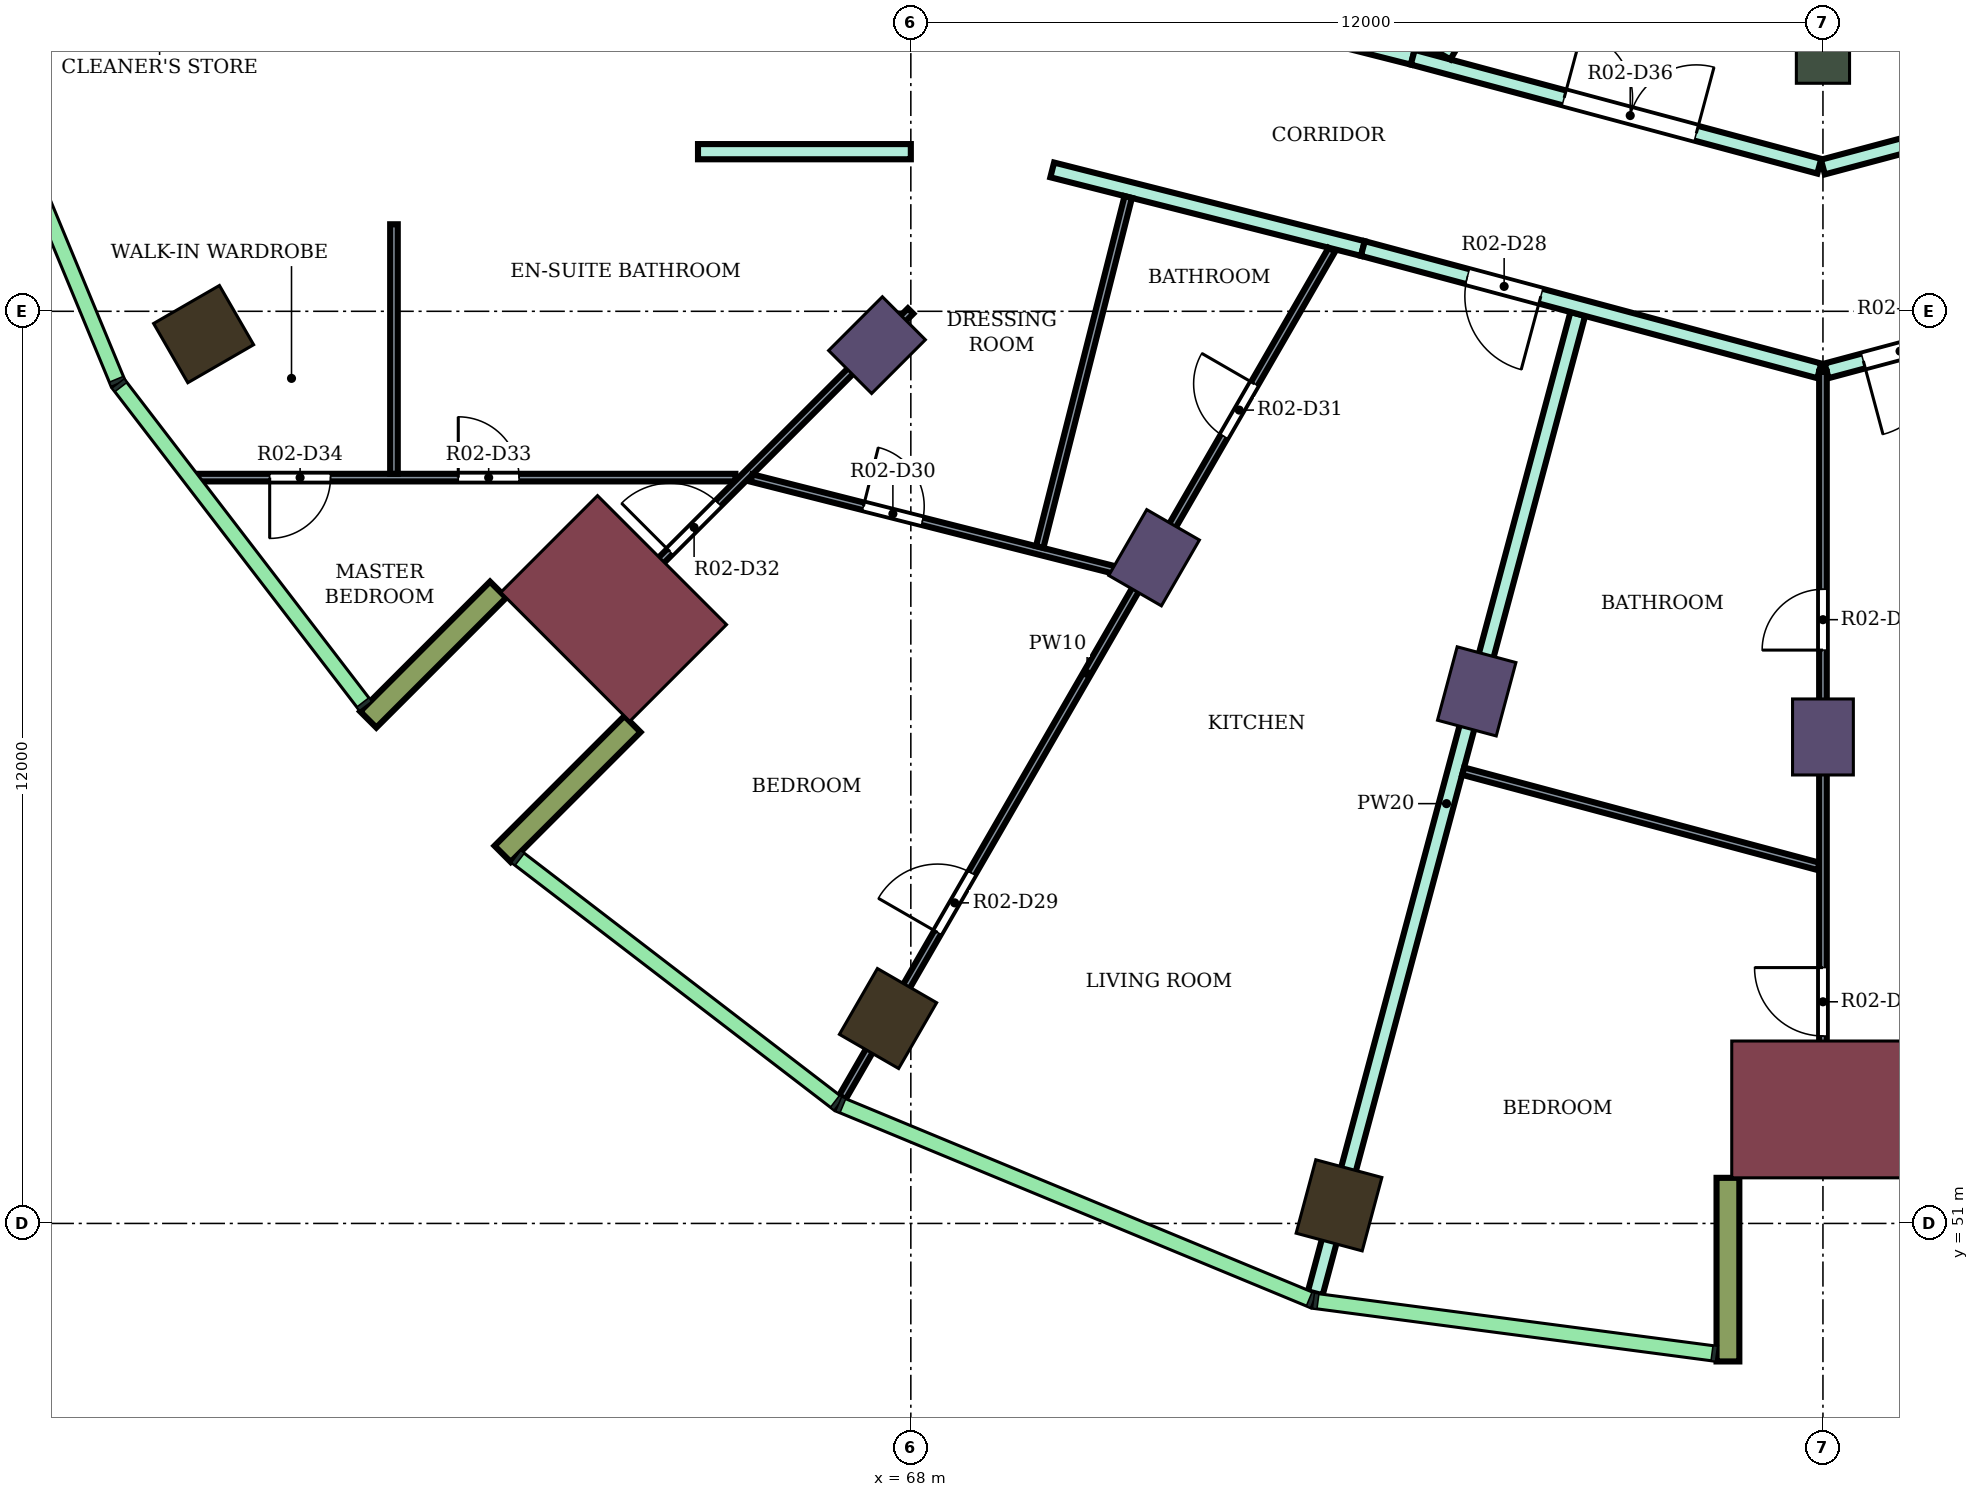
"""IFC4 building model, lengths in metres.
Left out: names, types, materials, properties, quantities, classifications, styles, units other than length and angle.
Written with IfcOpenShell. Run it as: python <this file> out.ifc"""

import sys

from ifc_helpers import new_model, si_unit, direction, frame, frame_2d, origin, origin_2d, place, context, subcontext, project, spatial, rectangle, extrude, element, fill, save


model = new_model("IFC4")
c1 = context("Model", 3, precision=1e-05, world=origin(), true_north=direction((0.0, 1.0)))
c2 = subcontext(c1, "Body", "Model", "MODEL_VIEW")
j1 = project(units=[si_unit("LENGTHUNIT", "METRE"), si_unit("PLANEANGLEUNIT", "RADIAN")], contexts=[c1])
p1 = place(None, origin())
s1 = spatial("IfcSite", under=j1, at=p1, CompositionType="ELEMENT")
p2 = place(p1, origin())
s2 = spatial("IfcBuilding", under=s1, at=p2, CompositionType="ELEMENT")
p3 = place(p2, frame((0.0, 0.0, 170.0)))
s3 = spatial("IfcBuildingStorey", under=s2, at=p3, CompositionType="ELEMENT", Elevation=170.0)
for number, where, z_axis, x_axis in (
    (1, (58.696, 62.7, 0.0), (0.0, 0.0, 1.0), (-0.866, -0.5, 0.0)),
    (2, (67.7, 53.696, 0.0), (0.0, 0.0, 1.0), (-0.5, -0.866, 0.0)),
    (3, (73.633, 51.238, 0.0), (0.0, 0.0, 1.0), (-0.259, -0.966, 0.0)),
):
    element("IfcColumn", number, at=place(p3, frame(where, z_axis=z_axis, x_axis=x_axis)), inside=s3, PredefinedType="COLUMN", context=c2, shape_type="SweptSolid", body=[
        extrude(rectangle(XDim=1.0, YDim=0.9, at=origin_2d()), origin(), (0.0, 0.0, 1.0), 4.1),
    ])
for number, where, z_axis, x_axis in (
    (4, (67.555, 62.555, 0.0), (0.0, 0.0, 1.0), (-0.707, -0.707, 0.0)),
    (5, (71.2, 59.758, 0.0), (0.0, 0.0, 1.0), (-0.5, -0.866, 0.0)),
    (6, (75.445, 58.0, 0.0), (0.0, 0.0, 1.0), (-0.259, -0.966, 0.0)),
    (7, (80.0, 57.4, 0.0), (0.0, 0.0, 1.0), (0.0, -1.0, 0.0)),
):
    element("IfcColumn", number, at=place(p3, frame(where, z_axis=z_axis, x_axis=x_axis)), inside=s3, PredefinedType="COLUMN", context=c2, shape_type="SweptSolid", body=[
        extrude(rectangle(XDim=1.0, YDim=0.8, at=origin_2d()), origin(), (0.0, 0.0, 1.0), 4.1),
    ])
p4 = place(p3, frame((80.0, 66.4, 0.0), z_axis=(0.0, 0.0, 1.0), x_axis=(0.0, -1.0, 0.0)))
e8 = element("IfcColumn", 8, at=p4, inside=s3, PredefinedType="COLUMN", context=c2, shape_type="SweptSolid", body=[
    extrude(rectangle(XDim=0.8, YDim=0.7, at=origin_2d()), origin(), (0.0, 0.0, 1.0), 4.1),
])
for number, where, z_axis, x_axis in (
    (9, (64.09, 59.09, 0.0), (0.0, 0.0, 1.0), (-0.707, -0.707, 0.0)),
    (10, (80.0, 52.5, 0.0), (0.0, 0.0, 1.0), (0.0, -1.0, 0.0)),
):
    element("IfcColumn", number, at=place(p3, frame(where, z_axis=z_axis, x_axis=x_axis)), inside=s3, PredefinedType="COLUMN", context=c2, shape_type="SweptSolid", body=[
        extrude(rectangle(XDim=1.8, YDim=2.4, at=origin_2d()), origin(), (0.0, 0.0, 1.0), 4.1),
    ])
for number, where, z_axis, x_axis in (
    (11, (62.57, 59.338, 0.0), (0.0, 0.0, 1.0), (-0.707, -0.707, 0.0)),
    (12, (64.338, 57.57, 0.0), (0.0, 0.0, 1.0), (-0.707, -0.707, 0.0)),
    (13, (78.75, 51.6, 0.0), (0.0, 0.0, 1.0), (0.0, -1.0, 0.0)),
):
    element("IfcWall", number, at=place(p3, frame(where, z_axis=z_axis, x_axis=x_axis)), inside=s3, PredefinedType="NOTDEFINED", context=c2, shape_type="SweptSolid", body=[
        extrude(rectangle(XDim=2.416, YDim=0.3, at=frame_2d((1.208, 0.0))), origin(), (0.0, 0.0, 1.0), 4.1),
    ])
p5 = place(p3, frame((65.2, 65.1, 0.0), z_axis=(0.0, 0.0, 1.0), x_axis=(1.0, 0.0, 0.0)))
e14 = element("IfcWall", 14, at=p5, inside=s3, PredefinedType="PARTITIONING", context=c2, shape_type="SweptSolid", body=[
    extrude(rectangle(XDim=2.8, YDim=0.2, at=frame_2d((1.4, 0.0))), origin(), (0.0, 0.0, 1.0), 3.65),
])
p6 = place(p3, frame((69.86, 64.86, 0.0), z_axis=(0.0, 0.0, 1.0), x_axis=(0.96942980222, -0.245368821506, 0.0)))
e15 = element("IfcWall", 15, at=p6, inside=s3, PredefinedType="PARTITIONING", context=c2, shape_type="SweptSolid", body=[
    extrude(rectangle(XDim=4.216, YDim=0.2, at=frame_2d((2.108, 0.0))), origin(), (0.0, 0.0, 1.0), 3.65),
])
p7 = place(p3, frame((72.1, 66.975, 0.0), z_axis=(0.0, 0.0, 1.0), x_axis=(0.969471314457, -0.245204752086, 0.0)))
e16 = element("IfcWall", 16, at=p7, inside=s3, PredefinedType="PARTITIONING", context=c2, shape_type="SweptSolid", body=[
    extrude(rectangle(XDim=2.582, YDim=0.2, at=frame_2d((1.291, 0.0))), origin(), (0.0, 0.0, 1.0), 3.65),
])
p8 = place(p7, frame((0.841, 0.0, 0.0)))
e17 = element("IfcOpeningElement", 17, at=p8, cuts=e16, PredefinedType="OPENING", context=c2, shape_type="SweptSolid", body=[
    extrude(rectangle(XDim=0.9, YDim=2.1, at=frame_2d((0.45, 1.05))), frame((0.0, 0.11, 0.0), z_axis=(0.0, -1.0, 0.0), x_axis=(1.0, 0.0, 0.0)), (0.0, 0.0, 1.0), 0.22),
])
p9 = place(p3, frame((73.321, 50.081, 0.0), z_axis=(0.0, 0.0, 1.0), x_axis=(0.258926994059, 0.965896894988, 0.0)))
e18 = element("IfcWall", 18, at=p9, inside=s3, PredefinedType="PARTITIONING", context=c2, shape_type="SweptSolid", body=[
    extrude(rectangle(XDim=13.338, YDim=0.2, at=frame_2d((6.669, 0.0))), origin(), (0.0, 0.0, 1.0), 3.65),
])
p10 = place(p3, frame((73.947, 63.826, 0.0), z_axis=(0.0, 0.0, 1.0), x_axis=(0.965908253407, -0.258884619088, 0.0)))
e19 = element("IfcWall", 19, at=p10, inside=s3, PredefinedType="PARTITIONING", context=c2, shape_type="SweptSolid", body=[
    extrude(rectangle(XDim=6.217, YDim=0.2, at=frame_2d((3.108, 0.0))), origin(), (0.0, 0.0, 1.0), 3.65),
])
p11 = place(p10, frame((1.424, 0.0, 0.0)))
e20 = element("IfcOpeningElement", 20, at=p11, cuts=e19, PredefinedType="OPENING", context=c2, shape_type="SweptSolid", body=[
    extrude(rectangle(XDim=1.0, YDim=2.1, at=frame_2d((0.5, 1.05))), frame((0.0, 0.11, 0.0), z_axis=(0.0, -1.0, 0.0), x_axis=(1.0, 0.0, 0.0)), (0.0, 0.0, 1.0), 0.22),
])
p12 = place(p3, frame((74.603, 66.342, 0.0), z_axis=(0.0, 0.0, 1.0), x_axis=(0.965895298152, -0.258932950796, 0.0)))
e21 = element("IfcWall", 21, at=p12, inside=s3, PredefinedType="PARTITIONING", context=c2, shape_type="SweptSolid", body=[
    extrude(rectangle(XDim=5.538, YDim=0.2, at=frame_2d((2.769, 0.0))), origin(), (0.0, 0.0, 1.0), 3.65),
])
p13 = place(p12, frame((2.062, 0.0, 0.0)))
e22 = element("IfcOpeningElement", 22, at=p13, cuts=e21, PredefinedType="OPENING", context=c2, shape_type="SweptSolid", body=[
    extrude(rectangle(XDim=1.8, YDim=2.1, at=frame_2d((0.9, 1.05))), frame((0.0, 0.11, 0.0), z_axis=(0.0, -1.0, 0.0), x_axis=(1.0, 0.0, 0.0)), (0.0, 0.0, 1.0), 0.22),
])
p14 = place(p3, frame((75.012, 66.363, 0.0), z_axis=(0.0, 0.0, 1.0), x_axis=(0.500168489725, 0.86592810434, 0.0)))
e23 = element("IfcWall", 23, at=p14, inside=s3, PredefinedType="PARTITIONING", context=c2, shape_type="SweptSolid", body=[
    extrude(rectangle(XDim=2.274, YDim=0.2, at=frame_2d((1.137, 0.0))), origin(), (0.0, 0.0, 1.0), 3.65),
])
p15 = place(p3, frame((80.0, 64.898, 0.0), z_axis=(0.0, 0.0, 1.0), x_axis=(0.966237419782, 0.257653349704, 0.0)))
e24 = element("IfcWall", 24, at=p15, inside=s3, PredefinedType="PARTITIONING", context=c2, shape_type="SweptSolid", body=[
    extrude(rectangle(XDim=8.169, YDim=0.2, at=frame_2d((4.084, 0.0))), origin(), (0.0, 0.0, 1.0), 3.65),
])
p16 = place(p15, frame((6.428, 0.0, 0.0)))
e25 = element("IfcOpeningElement", 25, at=p16, cuts=e24, PredefinedType="OPENING", context=c2, shape_type="SweptSolid", body=[
    extrude(rectangle(XDim=0.9, YDim=2.1, at=frame_2d((0.45, 1.05))), frame((0.0, 0.11, 0.0), z_axis=(0.0, -1.0, 0.0), x_axis=(1.0, 0.0, 0.0)), (0.0, 0.0, 1.0), 0.22),
])
p17 = place(p3, frame((80.048, 62.217, 0.0), z_axis=(0.0, 0.0, 1.0), x_axis=(0.965941520544, 0.258760466242, 0.0)))
e26 = element("IfcWall", 26, at=p17, inside=s3, PredefinedType="PARTITIONING", context=c2, shape_type="SweptSolid", body=[
    extrude(rectangle(XDim=6.006, YDim=0.2, at=frame_2d((3.003, 0.0))), origin(), (0.0, 0.0, 1.0), 3.65),
])
p18 = place(p17, frame((0.5, 0.0, 0.0)))
e27 = element("IfcOpeningElement", 27, at=p18, cuts=e26, PredefinedType="OPENING", context=c2, shape_type="SweptSolid", body=[
    extrude(rectangle(XDim=1.0, YDim=2.1, at=frame_2d((0.5, 1.05))), frame((0.0, 0.11, 0.0), z_axis=(0.0, -1.0, 0.0), x_axis=(1.0, 0.0, 0.0)), (0.0, 0.0, 1.0), 0.22),
])
p19 = place(p3, frame((58.6, 60.812, 0.0), z_axis=(0.0, 0.0, 1.0), x_axis=(1.0, 0.0, 0.0)))
e28 = element("IfcWall", 28, at=p19, inside=s3, PredefinedType="PARTITIONING", context=c2, shape_type="SweptSolid", body=[
    extrude(rectangle(XDim=7.092, YDim=0.1, at=frame_2d((3.546, 0.0))), origin(), (0.0, 0.0, 1.0), 3.65),
])
p20 = place(p19, frame((3.446, 0.0, 0.0)))
e29 = element("IfcOpeningElement", 29, at=p20, cuts=e28, PredefinedType="OPENING", context=c2, shape_type="SweptSolid", body=[
    extrude(rectangle(XDim=0.8, YDim=2.1, at=frame_2d((0.4, 1.05))), frame((0.0, 0.06, 0.0), z_axis=(0.0, -1.0, 0.0), x_axis=(1.0, 0.0, 0.0)), (0.0, 0.0, 1.0), 0.12),
])
p21 = place(p19, frame((0.965, 0.0, 0.0)))
e30 = element("IfcOpeningElement", 30, at=p21, cuts=e28, PredefinedType="OPENING", context=c2, shape_type="SweptSolid", body=[
    extrude(rectangle(XDim=0.8, YDim=2.1, at=frame_2d((0.4, 1.05))), frame((0.0, 0.06, 0.0), z_axis=(0.0, -1.0, 0.0), x_axis=(1.0, 0.0, 0.0)), (0.0, 0.0, 1.0), 0.12),
])
p22 = place(p3, frame((61.2, 60.862, 0.0), z_axis=(0.0, 0.0, 1.0), x_axis=(0.0, 1.0, 0.0)))
e31 = element("IfcWall", 31, at=p22, inside=s3, PredefinedType="PARTITIONING", context=c2, shape_type="SweptSolid", body=[
    extrude(rectangle(XDim=3.283, YDim=0.1, at=frame_2d((1.642, 0.0))), origin(), (0.0, 0.0, 1.0), 3.65),
])
p23 = place(p3, frame((63.591, 58.6, 0.0), z_axis=(0.0, 0.0, 1.0), x_axis=(0.707263550227, 0.706949977382, 0.0)))
e32 = element("IfcWall", 32, at=p23, inside=s3, PredefinedType="PARTITIONING", context=c2, shape_type="SweptSolid", body=[
    extrude(rectangle(XDim=6.229, YDim=0.1, at=frame_2d((3.114, 0.0))), origin(), (0.0, 0.0, 1.0), 3.65),
])
p24 = place(p23, frame((1.752, 0.0, 0.0)))
e33 = element("IfcOpeningElement", 33, at=p24, cuts=e32, PredefinedType="OPENING", context=c2, shape_type="SweptSolid", body=[
    extrude(rectangle(XDim=0.9, YDim=2.1, at=frame_2d((0.45, 1.05))), frame((0.0, 0.06, 0.0), z_axis=(0.0, -1.0, 0.0), x_axis=(1.0, 0.0, 0.0)), (0.0, 0.0, 1.0), 0.12),
])
p25 = place(p3, frame((65.904, 60.807, 0.0), z_axis=(0.0, 0.0, 1.0), x_axis=(0.969391307129, -0.245520861971, 0.0)))
e34 = element("IfcWall", 34, at=p25, inside=s3, PredefinedType="PARTITIONING", context=c2, shape_type="SweptSolid", body=[
    extrude(rectangle(XDim=5.251, YDim=0.1, at=frame_2d((2.625, 0.0))), origin(), (0.0, 0.0, 1.0), 3.65),
])
p26 = place(p25, frame((1.519, 0.0, 0.0)))
e35 = element("IfcOpeningElement", 35, at=p26, cuts=e34, PredefinedType="OPENING", context=c2, shape_type="SweptSolid", body=[
    extrude(rectangle(XDim=0.8, YDim=2.1, at=frame_2d((0.4, 1.05))), frame((0.0, 0.06, 0.0), z_axis=(0.0, -1.0, 0.0), x_axis=(1.0, 0.0, 0.0)), (0.0, 0.0, 1.0), 0.12),
])
p27 = place(p3, frame((67.1, 52.659, 0.0), z_axis=(0.0, 0.0, 1.0), x_axis=(0.500072574725, 0.865983498692, 0.0)))
e36 = element("IfcWall", 36, at=p27, inside=s3, PredefinedType="PARTITIONING", context=c2, shape_type="SweptSolid", body=[
    extrude(rectangle(XDim=12.876, YDim=0.1, at=frame_2d((6.438, 0.0))), origin(), (0.0, 0.0, 1.0), 3.65),
])
p28 = place(p27, frame((2.504, 0.0, 0.0)))
e37 = element("IfcOpeningElement", 37, at=p28, cuts=e36, PredefinedType="OPENING", context=c2, shape_type="SweptSolid", body=[
    extrude(rectangle(XDim=0.9, YDim=2.1, at=frame_2d((0.45, 1.05))), frame((0.0, 0.06, 0.0), z_axis=(0.0, -1.0, 0.0), x_axis=(1.0, 0.0, 0.0)), (0.0, 0.0, 1.0), 0.12),
])
p29 = place(p27, frame((10.04, 0.0, 0.0)))
e38 = element("IfcOpeningElement", 38, at=p29, cuts=e36, PredefinedType="OPENING", context=c2, shape_type="SweptSolid", body=[
    extrude(rectangle(XDim=0.8, YDim=2.1, at=frame_2d((0.4, 1.05))), frame((0.0, 0.06, 0.0), z_axis=(0.0, -1.0, 0.0), x_axis=(1.0, 0.0, 0.0)), (0.0, 0.0, 1.0), 0.12),
])
p30 = place(p3, frame((69.695, 59.899, 0.0), z_axis=(0.0, 0.0, 1.0), x_axis=(0.245292232594, 0.96944918414, 0.0)))
e39 = element("IfcWall", 39, at=p30, inside=s3, PredefinedType="PARTITIONING", context=c2, shape_type="SweptSolid", body=[
    extrude(rectangle(XDim=4.75, YDim=0.1, at=frame_2d((2.375, 0.0))), origin(), (0.0, 0.0, 1.0), 3.65),
])
p31 = place(p3, frame((75.267, 56.95, 0.0), z_axis=(0.0, 0.0, 1.0), x_axis=(0.965934541962, -0.258786515577, 0.0)))
e40 = element("IfcWall", 40, at=p31, inside=s3, PredefinedType="PARTITIONING", context=c2, shape_type="SweptSolid", body=[
    extrude(rectangle(XDim=4.84, YDim=0.1, at=frame_2d((2.42, 0.0))), origin(), (0.0, 0.0, 1.0), 3.65),
])
p32 = place(p3, frame((80.0, 51.8, 0.0), z_axis=(0.0, 0.0, 1.0), x_axis=(0.0, 1.0, 0.0)))
e41 = element("IfcWall", 41, at=p32, inside=s3, PredefinedType="PARTITIONING", context=c2, shape_type="SweptSolid", body=[
    extrude(rectangle(XDim=10.404, YDim=0.1, at=frame_2d((5.202, 0.0))), origin(), (0.0, 0.0, 1.0), 3.65),
])
p33 = place(p32, frame((1.666, 0.0, 0.0)))
e42 = element("IfcOpeningElement", 42, at=p33, cuts=e41, PredefinedType="OPENING", context=c2, shape_type="SweptSolid", body=[
    extrude(rectangle(XDim=0.9, YDim=2.1, at=frame_2d((0.45, 1.05))), frame((0.0, 0.06, 0.0), z_axis=(0.0, -1.0, 0.0), x_axis=(1.0, 0.0, 0.0)), (0.0, 0.0, 1.0), 0.12),
])
p34 = place(p32, frame((6.743, 0.0, 0.0)))
e43 = element("IfcOpeningElement", 43, at=p34, cuts=e41, PredefinedType="OPENING", context=c2, shape_type="SweptSolid", body=[
    extrude(rectangle(XDim=0.8, YDim=2.1, at=frame_2d((0.4, 1.05))), frame((0.0, 0.06, 0.0), z_axis=(0.0, -1.0, 0.0), x_axis=(1.0, 0.0, 0.0)), (0.0, 0.0, 1.0), 0.12),
])
p35 = place(p18, frame((1.0, 0.0, 0.0), z_axis=(0.0, 0.0, 1.0), x_axis=(-1.0, 0.0, 0.0)))
e44 = element("IfcDoor", 44, at=p35, inside=s3, OperationType="SINGLE_SWING_RIGHT", PredefinedType="DOOR", context=c2, shape_type="SweptSolid", body=[
    extrude(rectangle(XDim=1.0, YDim=2.1, at=frame_2d((0.5, 1.05))), frame((0.0, 0.025, 0.0), z_axis=(0.0, -1.0, 0.0), x_axis=(1.0, 0.0, 0.0)), (0.0, 0.0, 1.0), 0.05),
])
fill(e27, e44)
p36 = place(p33, origin())
e45 = element("IfcDoor", 45, at=p36, inside=s3, OperationType="SINGLE_SWING_RIGHT", PredefinedType="DOOR", context=c2, shape_type="SweptSolid", body=[
    extrude(rectangle(XDim=0.9, YDim=2.1, at=frame_2d((0.45, 1.05))), frame((0.0, 0.025, 0.0), z_axis=(0.0, -1.0, 0.0), x_axis=(1.0, 0.0, 0.0)), (0.0, 0.0, 1.0), 0.05),
])
fill(e42, e45)
p37 = place(p34, origin())
e46 = element("IfcDoor", 46, at=p37, inside=s3, OperationType="SINGLE_SWING_LEFT", PredefinedType="DOOR", context=c2, shape_type="SweptSolid", body=[
    extrude(rectangle(XDim=0.8, YDim=2.1, at=frame_2d((0.4, 1.05))), frame((0.0, 0.025, 0.0), z_axis=(0.0, -1.0, 0.0), x_axis=(1.0, 0.0, 0.0)), (0.0, 0.0, 1.0), 0.05),
])
fill(e43, e46)
p38 = place(p11, frame((1.0, 0.0, 0.0), z_axis=(0.0, 0.0, 1.0), x_axis=(-1.0, 0.0, 0.0)))
e47 = element("IfcDoor", 47, at=p38, inside=s3, OperationType="SINGLE_SWING_LEFT", PredefinedType="DOOR", context=c2, shape_type="SweptSolid", body=[
    extrude(rectangle(XDim=1.0, YDim=2.1, at=frame_2d((0.5, 1.05))), frame((0.0, 0.025, 0.0), z_axis=(0.0, -1.0, 0.0), x_axis=(1.0, 0.0, 0.0)), (0.0, 0.0, 1.0), 0.05),
])
fill(e20, e47)
p39 = place(p28, origin())
e48 = element("IfcDoor", 48, at=p39, inside=s3, OperationType="SINGLE_SWING_LEFT", PredefinedType="DOOR", context=c2, shape_type="SweptSolid", body=[
    extrude(rectangle(XDim=0.9, YDim=2.1, at=frame_2d((0.45, 1.05))), frame((0.0, 0.025, 0.0), z_axis=(0.0, -1.0, 0.0), x_axis=(1.0, 0.0, 0.0)), (0.0, 0.0, 1.0), 0.05),
])
fill(e37, e48)
p40 = place(p26, origin())
e49 = element("IfcDoor", 49, at=p40, inside=s3, OperationType="SINGLE_SWING_LEFT", PredefinedType="DOOR", context=c2, shape_type="SweptSolid", body=[
    extrude(rectangle(XDim=0.8, YDim=2.1, at=frame_2d((0.4, 1.05))), frame((0.0, 0.025, 0.0), z_axis=(0.0, -1.0, 0.0), x_axis=(1.0, 0.0, 0.0)), (0.0, 0.0, 1.0), 0.05),
])
fill(e35, e49)
p41 = place(p29, origin())
e50 = element("IfcDoor", 50, at=p41, inside=s3, OperationType="SINGLE_SWING_RIGHT", PredefinedType="DOOR", context=c2, shape_type="SweptSolid", body=[
    extrude(rectangle(XDim=0.8, YDim=2.1, at=frame_2d((0.4, 1.05))), frame((0.0, 0.025, 0.0), z_axis=(0.0, -1.0, 0.0), x_axis=(1.0, 0.0, 0.0)), (0.0, 0.0, 1.0), 0.05),
])
fill(e38, e50)
p42 = place(p24, origin())
e51 = element("IfcDoor", 51, at=p42, inside=s3, OperationType="SINGLE_SWING_LEFT", PredefinedType="DOOR", context=c2, shape_type="SweptSolid", body=[
    extrude(rectangle(XDim=0.9, YDim=2.1, at=frame_2d((0.45, 1.05))), frame((0.0, 0.025, 0.0), z_axis=(0.0, -1.0, 0.0), x_axis=(1.0, 0.0, 0.0)), (0.0, 0.0, 1.0), 0.05),
])
fill(e33, e51)
p43 = place(p20, origin())
e52 = element("IfcDoor", 52, at=p43, inside=s3, OperationType="SINGLE_SWING_LEFT", PredefinedType="DOOR", context=c2, shape_type="SweptSolid", body=[
    extrude(rectangle(XDim=0.8, YDim=2.1, at=frame_2d((0.4, 1.05))), frame((0.0, 0.025, 0.0), z_axis=(0.0, -1.0, 0.0), x_axis=(1.0, 0.0, 0.0)), (0.0, 0.0, 1.0), 0.05),
])
fill(e29, e52)
p44 = place(p21, frame((0.8, 0.0, 0.0), z_axis=(0.0, 0.0, 1.0), x_axis=(-1.0, 0.0, 0.0)))
e53 = element("IfcDoor", 53, at=p44, inside=s3, OperationType="SINGLE_SWING_RIGHT", PredefinedType="DOOR", context=c2, shape_type="SweptSolid", body=[
    extrude(rectangle(XDim=0.8, YDim=2.1, at=frame_2d((0.4, 1.05))), frame((0.0, 0.025, 0.0), z_axis=(0.0, -1.0, 0.0), x_axis=(1.0, 0.0, 0.0)), (0.0, 0.0, 1.0), 0.05),
])
fill(e30, e53)
p45 = place(p13, origin())
e54 = element("IfcDoor", 54, at=p45, inside=s3, OperationType="DOUBLE_DOOR_SINGLE_SWING", PredefinedType="DOOR", context=c2, shape_type="SweptSolid", body=[
    extrude(rectangle(XDim=1.8, YDim=2.1, at=frame_2d((0.9, 1.05))), frame((0.0, 0.025, 0.0), z_axis=(0.0, -1.0, 0.0), x_axis=(1.0, 0.0, 0.0)), (0.0, 0.0, 1.0), 0.05),
])
fill(e22, e54)
save(model, sys.argv[1])
